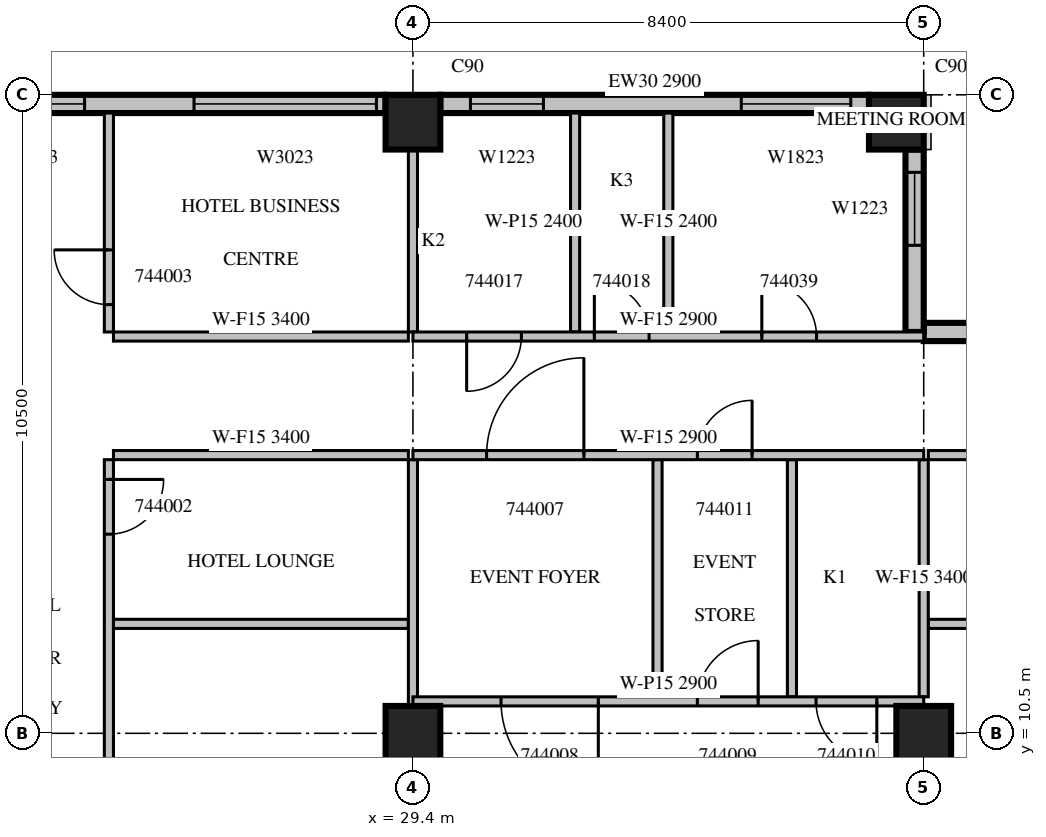
"""IFC4 building model, lengths in metres.
Left out: names, types, materials, properties, quantities, classifications, styles, units other than length and angle.
Written with IfcOpenShell. Run it as: python <this file> out.ifc"""

import sys

from ifc_helpers import new_model, si_unit, direction, frame, frame_2d, origin, origin_2d, place, context, subcontext, project, spatial, rectangle, extrude, source, transform, mapped, element, fill, save


model = new_model("IFC4")
c1 = context("Model", 3, precision=1e-05, world=origin(), true_north=direction((0.0, 1.0)))
c2 = subcontext(c1, "Body", "Model", "MODEL_VIEW")
j1 = project(units=[si_unit("LENGTHUNIT", "METRE"), si_unit("PLANEANGLEUNIT", "RADIAN")], contexts=[c1])
p1 = place(None, origin())
s1 = spatial("IfcSite", under=j1, at=p1, CompositionType="ELEMENT")
p2 = place(p1, origin())
s2 = spatial("IfcBuilding", under=s1, at=p2, CompositionType="ELEMENT")
p3 = place(p2, frame((0.0, 0.0, 200.6)))
s3 = spatial("IfcBuildingStorey", under=s2, at=p3, CompositionType="ELEMENT", Elevation=200.6)
m1 = source(origin(), c2, "Body", "SweptSolid", [
    extrude(rectangle(XDim=0.9, YDim=0.9, at=origin_2d()), origin(), (0.0, 0.0, 1.0), 3.8),
])
for number, where, z_axis, x_axis in (
    (1, (29.4, 10.5, 0.0), (0.0, 0.0, 1.0), (1.0, 0.0, 0.0)),
    (2, (37.8, 10.5, 0.0), (0.0, 0.0, 1.0), (1.0, 0.0, 0.0)),
    (3, (29.4, 20.55, 0.0), (0.0, 0.0, 1.0), (1.0, 0.0, 0.0)),
    (4, (37.35, 20.55, 0.0), (0.0, 0.0, 1.0), (1.0, 0.0, 0.0)),
):
    element("IfcColumn", number, at=place(p3, frame(where, z_axis=z_axis, x_axis=x_axis)), inside=s3, PredefinedType="COLUMN", context=c2, shape_type="MappedRepresentation", body=[
        mapped(m1, transform((0.0, 0.0, 0.0), scale=1.0)),
    ])
p4 = place(p3, frame((53.56, 17.1, 0.0), z_axis=(0.0, 0.0, 1.0), x_axis=(-1.0, 0.0, 0.0)))
e5 = element("IfcWall", 5, at=p4, inside=s3, PredefinedType="STANDARD", context=c2, shape_type="SweptSolid", body=[
    extrude(rectangle(XDim=15.76, YDim=0.3, at=frame_2d((7.88, 0.0))), origin(), (0.0, 0.0, 1.0), 3.4),
])
m2 = source(origin(), c2, "Body", "SweptSolid", [
    extrude(rectangle(XDim=3.6, YDim=2.3, at=frame_2d((1.8, 1.15))), frame((0.0, 0.16, 0.0), z_axis=(0.0, -1.0, 0.0), x_axis=(1.0, 0.0, 0.0)), (0.0, 0.0, 1.0), 0.32),
])
p5 = place(p4, frame((3.46, 0.0, 0.6)))
e6 = element("IfcOpeningElement", 6, at=p5, cuts=e5, PredefinedType="OPENING", context=c2, shape_type="MappedRepresentation", body=[
    mapped(m2, transform((0.0, 0.0, 0.0), scale=1.0)),
])
p6 = place(p4, frame((9.34, 0.0, 0.6)))
e7 = element("IfcOpeningElement", 7, at=p6, cuts=e5, PredefinedType="OPENING", context=c2, shape_type="MappedRepresentation", body=[
    mapped(m2, transform((0.0, 0.0, 0.0), scale=1.0)),
])
m3 = source(origin(), c2, "Body", "SweptSolid", [
    extrude(rectangle(XDim=2.4, YDim=2.3, at=frame_2d((1.2, 1.15))), frame((0.0, 0.16, 0.0), z_axis=(0.0, -1.0, 0.0), x_axis=(1.0, 0.0, 0.0)), (0.0, 0.0, 1.0), 0.32),
])
p7 = place(p4, frame((0.53, 0.0, 0.6)))
e8 = element("IfcOpeningElement", 8, at=p7, cuts=e5, PredefinedType="OPENING", context=c2, shape_type="MappedRepresentation", body=[
    mapped(m3, transform((0.0, 0.0, 0.0), scale=1.0)),
])
m4 = source(origin(), c2, "Body", "SweptSolid", [
    extrude(rectangle(XDim=3.0, YDim=0.3, at=frame_2d((1.5, 0.0))), origin(), (0.0, 0.0, 1.0), 3.4),
])
p8 = place(p3, frame((37.65, 17.1, 0.0), z_axis=(0.0, 0.0, 1.0), x_axis=(0.0, 1.0, 0.0)))
e9 = element("IfcWall", 9, at=p8, inside=s3, PredefinedType="STANDARD", context=c2, shape_type="MappedRepresentation", body=[
    mapped(m4, transform((0.0, 0.0, 0.0), scale=1.0)),
])
m5 = source(origin(), c2, "Body", "SweptSolid", [
    extrude(rectangle(XDim=1.2, YDim=2.3, at=frame_2d((0.6, 1.15))), frame((0.0, 0.16, 0.0), z_axis=(0.0, -1.0, 0.0), x_axis=(1.0, 0.0, 0.0)), (0.0, 0.0, 1.0), 0.32),
])
p9 = place(p8, frame((1.425, 0.0, 0.6)))
e10 = element("IfcOpeningElement", 10, at=p9, cuts=e9, PredefinedType="OPENING", context=c2, shape_type="MappedRepresentation", body=[
    mapped(m5, transform((0.0, 0.0, 0.0), scale=1.0)),
])
m6 = source(origin(), c2, "Body", "SweptSolid", [
    extrude(rectangle(XDim=7.05, YDim=0.3, at=frame_2d((3.525, 0.0))), origin(), (0.0, 0.0, 1.0), 2.9),
])
p10 = place(p3, frame((36.9, 20.85, 0.0), z_axis=(0.0, 0.0, 1.0), x_axis=(-1.0, 0.0, 0.0)))
e11 = element("IfcWall", 11, at=p10, inside=s3, PredefinedType="STANDARD", context=c2, shape_type="MappedRepresentation", body=[
    mapped(m6, transform((0.0, 0.0, 0.0), scale=1.0)),
])
m7 = source(origin(), c2, "Body", "SweptSolid", [
    extrude(rectangle(XDim=1.8, YDim=2.3, at=frame_2d((0.9, 1.15))), frame((0.0, 0.16, 0.0), z_axis=(0.0, -1.0, 0.0), x_axis=(1.0, 0.0, 0.0)), (0.0, 0.0, 1.0), 0.32),
])
p11 = place(p10, frame((0.3, 0.0, 0.6)))
e12 = element("IfcOpeningElement", 12, at=p11, cuts=e11, PredefinedType="OPENING", context=c2, shape_type="MappedRepresentation", body=[
    mapped(m7, transform((0.0, 0.0, 0.0), scale=1.0)),
])
p12 = place(p10, frame((5.354, 0.0, 0.6)))
e13 = element("IfcOpeningElement", 13, at=p12, cuts=e11, PredefinedType="OPENING", context=c2, shape_type="MappedRepresentation", body=[
    mapped(m5, transform((0.0, 0.0, 0.0), scale=1.0)),
])
m8 = source(origin(), c2, "Body", "SweptSolid", [
    extrude(rectangle(XDim=7.15, YDim=0.3, at=frame_2d((3.575, 0.0))), origin(), (0.0, 0.0, 1.0), 3.4),
])
p13 = place(p3, frame((28.95, 20.85, 0.0), z_axis=(0.0, 0.0, 1.0), x_axis=(-1.0, 0.0, 0.0)))
e14 = element("IfcWall", 14, at=p13, inside=s3, PredefinedType="STANDARD", context=c2, shape_type="MappedRepresentation", body=[
    mapped(m8, transform((0.0, 0.0, 0.0), scale=1.0)),
])
m9 = source(origin(), c2, "Body", "SweptSolid", [
    extrude(rectangle(XDim=3.0, YDim=2.3, at=frame_2d((1.5, 1.15))), frame((0.0, 0.16, 0.0), z_axis=(0.0, -1.0, 0.0), x_axis=(1.0, 0.0, 0.0)), (0.0, 0.0, 1.0), 0.32),
])
p14 = place(p13, frame((0.15, 0.0, 0.6)))
e15 = element("IfcOpeningElement", 15, at=p14, cuts=e14, PredefinedType="OPENING", context=c2, shape_type="MappedRepresentation", body=[
    mapped(m9, transform((0.0, 0.0, 0.0), scale=1.0)),
])
p15 = place(p13, frame((4.95, 0.0, 0.6)))
e16 = element("IfcOpeningElement", 16, at=p15, cuts=e14, PredefinedType="OPENING", context=c2, shape_type="MappedRepresentation", body=[
    mapped(m7, transform((0.0, 0.0, 0.0), scale=1.0)),
])
m10 = source(origin(), c2, "Body", "SweptSolid", [
    extrude(rectangle(XDim=11.525, YDim=0.15, at=frame_2d((5.763, 0.0))), origin(), (0.0, 0.0, 1.0), 3.4),
])
p16 = place(p3, frame((24.4, 15.0, 0.0), z_axis=(0.0, 0.0, 1.0), x_axis=(0.0, -1.0, 0.0)))
e17 = element("IfcWall", 17, at=p16, inside=s3, PredefinedType="PARTITIONING", context=c2, shape_type="MappedRepresentation", body=[
    mapped(m10, transform((0.0, 0.0, 0.0), scale=1.0)),
])
m11 = source(origin(), c2, "Body", "SweptSolid", [
    extrude(rectangle(XDim=0.9, YDim=2.1, at=frame_2d((0.45, 1.05))), frame((0.0, 0.085, 0.0), z_axis=(0.0, -1.0, 0.0), x_axis=(1.0, 0.0, 0.0)), (0.0, 0.0, 1.0), 0.17),
])
p17 = place(p16, frame((6.963, 0.0, 0.0)))
e18 = element("IfcOpeningElement", 18, at=p17, cuts=e17, PredefinedType="OPENING", context=c2, shape_type="MappedRepresentation", body=[
    mapped(m11, transform((0.0, 0.0, 0.0), scale=1.0)),
])
p18 = place(p16, frame((0.325, 0.0, 0.0)))
e19 = element("IfcOpeningElement", 19, at=p18, cuts=e17, PredefinedType="OPENING", context=c2, shape_type="MappedRepresentation", body=[
    mapped(m11, transform((0.0, 0.0, 0.0), scale=1.0)),
])
m12 = source(origin(), c2, "Body", "SweptSolid", [
    extrude(rectangle(XDim=3.6, YDim=0.15, at=frame_2d((1.8, 0.0))), origin(), (0.0, 0.0, 1.0), 3.4),
])
p19 = place(p3, frame((24.4, 20.7, 0.0), z_axis=(0.0, 0.0, 1.0), x_axis=(0.0, -1.0, 0.0)))
e20 = element("IfcWall", 20, at=p19, inside=s3, PredefinedType="PARTITIONING", context=c2, shape_type="MappedRepresentation", body=[
    mapped(m12, transform((0.0, 0.0, 0.0), scale=1.0)),
])
p20 = place(p19, frame((2.25, 0.0, 0.0)))
e21 = element("IfcOpeningElement", 21, at=p20, cuts=e20, PredefinedType="OPENING", context=c2, shape_type="MappedRepresentation", body=[
    mapped(m11, transform((0.0, 0.0, 0.0), scale=1.0)),
])
p21 = place(p3, frame((29.325, 12.3, 0.0), z_axis=(0.0, 0.0, 1.0), x_axis=(-1.0, 0.0, 0.0)))
e22 = element("IfcWall", 22, at=p21, inside=s3, PredefinedType="PARTITIONING", context=c2, shape_type="SweptSolid", body=[
    extrude(rectangle(XDim=4.85, YDim=0.15, at=frame_2d((2.425, 0.0))), origin(), (0.0, 0.0, 1.0), 3.4),
])
m13 = source(origin(), c2, "Body", "SweptSolid", [
    extrude(rectangle(XDim=4.85, YDim=0.15, at=frame_2d((2.425, 0.0))), origin(), (0.0, 0.0, 1.0), 3.4),
])
for number, where, z_axis, x_axis in (
    (23, (29.325, 15.075, 0.0), (0.0, 0.0, 1.0), (-1.0, 0.0, 0.0)),
    (24, (24.475, 17.025, 0.0), (0.0, 0.0, 1.0), (1.0, 0.0, 0.0)),
):
    element("IfcWall", number, at=place(p3, frame(where, z_axis=z_axis, x_axis=x_axis)), inside=s3, PredefinedType="PARTITIONING", context=c2, shape_type="MappedRepresentation", body=[
        mapped(m13, transform((0.0, 0.0, 0.0), scale=1.0)),
    ])
m14 = source(origin(), c2, "Body", "SweptSolid", [
    extrude(rectangle(XDim=4.051, YDim=0.15, at=frame_2d((2.026, 0.0))), origin(), (0.0, 0.0, 1.0), 3.4),
])
p22 = place(p3, frame((29.4, 10.949, 0.0), z_axis=(0.0, 0.0, 1.0), x_axis=(0.0, 1.0, 0.0)))
e25 = element("IfcWall", 25, at=p22, inside=s3, PredefinedType="PARTITIONING", context=c2, shape_type="MappedRepresentation", body=[
    mapped(m14, transform((0.0, 0.0, 0.0), scale=1.0)),
])
m15 = source(origin(), c2, "Body", "SweptSolid", [
    extrude(rectangle(XDim=3.001, YDim=0.15, at=frame_2d((1.5, 0.0))), origin(), (0.0, 0.0, 1.0), 3.4),
])
p23 = place(p3, frame((29.4, 17.1, 0.0), z_axis=(0.0, 0.0, 1.0), x_axis=(0.0, 1.0, 0.0)))
e26 = element("IfcWall", 26, at=p23, inside=s3, PredefinedType="PARTITIONING", context=c2, shape_type="MappedRepresentation", body=[
    mapped(m15, transform((0.0, 0.0, 0.0), scale=1.0)),
])
m16 = source(origin(), c2, "Body", "SweptSolid", [
    extrude(rectangle(XDim=6.45, YDim=0.15, at=frame_2d((3.225, 0.0))), origin(), (0.0, 0.0, 1.0), 3.4),
])
p24 = place(p3, frame((37.875, 12.3, 0.0), z_axis=(0.0, 0.0, 1.0), x_axis=(1.0, 0.0, 0.0)))
e27 = element("IfcWall", 27, at=p24, inside=s3, PredefinedType="PARTITIONING", context=c2, shape_type="MappedRepresentation", body=[
    mapped(m16, transform((0.0, 0.0, 0.0), scale=1.0)),
])
p25 = place(p3, frame((44.325, 15.075, 0.0), z_axis=(0.0, 0.0, 1.0), x_axis=(-1.0, 0.0, 0.0)))
e28 = element("IfcWall", 28, at=p25, inside=s3, PredefinedType="PARTITIONING", context=c2, shape_type="MappedRepresentation", body=[
    mapped(m16, transform((0.0, 0.0, 0.0), scale=1.0)),
])
p26 = place(p25, frame((2.812, 0.0, 0.0)))
e29 = element("IfcOpeningElement", 29, at=p26, cuts=e28, PredefinedType="OPENING", context=c2, shape_type="MappedRepresentation", body=[
    mapped(m11, transform((0.0, 0.0, 0.0), scale=1.0)),
])
m17 = source(origin(), c2, "Body", "SweptSolid", [
    extrude(rectangle(XDim=3.9, YDim=0.15, at=frame_2d((1.95, 0.0))), origin(), (0.0, 0.0, 1.0), 3.4),
])
for number, where, z_axis, x_axis in (
    (30, (33.422, 11.1, 0.0), (0.0, 0.0, 1.0), (0.0, 1.0, 0.0)),
    (31, (35.633, 11.1, 0.0), (0.0, 0.0, 1.0), (0.0, 1.0, 0.0)),
    (32, (37.8, 11.1, 0.0), (0.0, 0.0, 1.0), (0.0, 1.0, 0.0)),
):
    element("IfcWall", number, at=place(p3, frame(where, z_axis=z_axis, x_axis=x_axis)), inside=s3, PredefinedType="PARTITIONING", context=c2, shape_type="MappedRepresentation", body=[
        mapped(m17, transform((0.0, 0.0, 0.0), scale=1.0)),
    ])
m18 = source(origin(), c2, "Body", "SweptSolid", [
    extrude(rectangle(XDim=8.4, YDim=0.15, at=frame_2d((4.2, 0.0))), origin(), (0.0, 0.0, 1.0), 2.9),
])
p27 = place(p3, frame((37.8, 11.025, 0.0), z_axis=(0.0, 0.0, 1.0), x_axis=(-1.0, 0.0, 0.0)))
e33 = element("IfcWall", 33, at=p27, inside=s3, PredefinedType="PARTITIONING", context=c2, shape_type="MappedRepresentation", body=[
    mapped(m18, transform((0.0, 0.0, 0.0), scale=1.0)),
])
m19 = source(origin(), c2, "Body", "SweptSolid", [
    extrude(rectangle(XDim=1.6, YDim=2.1, at=frame_2d((0.8, 1.05))), frame((0.0, 0.085, 0.0), z_axis=(0.0, -1.0, 0.0), x_axis=(1.0, 0.0, 0.0)), (0.0, 0.0, 1.0), 0.17),
])
p28 = place(p27, frame((5.351, 0.0, 0.0)))
e34 = element("IfcOpeningElement", 34, at=p28, cuts=e33, PredefinedType="OPENING", context=c2, shape_type="MappedRepresentation", body=[
    mapped(m19, transform((0.0, 0.0, 0.0), scale=1.0)),
])
m20 = source(origin(), c2, "Body", "SweptSolid", [
    extrude(rectangle(XDim=1.0, YDim=2.1, at=frame_2d((0.5, 1.05))), frame((0.0, 0.085, 0.0), z_axis=(0.0, -1.0, 0.0), x_axis=(1.0, 0.0, 0.0)), (0.0, 0.0, 1.0), 0.17),
])
p29 = place(p27, frame((2.722, 0.0, 0.0)))
e35 = element("IfcOpeningElement", 35, at=p29, cuts=e33, PredefinedType="OPENING", context=c2, shape_type="MappedRepresentation", body=[
    mapped(m20, transform((0.0, 0.0, 0.0), scale=1.0)),
])
p30 = place(p27, frame((0.771, 0.0, 0.0)))
e36 = element("IfcOpeningElement", 36, at=p30, cuts=e33, PredefinedType="OPENING", context=c2, shape_type="MappedRepresentation", body=[
    mapped(m20, transform((0.0, 0.0, 0.0), scale=1.0)),
])
m21 = source(origin(), c2, "Body", "SweptSolid", [
    extrude(rectangle(XDim=3.6, YDim=0.15, at=frame_2d((1.8, 0.0))), origin(), (0.0, 0.0, 1.0), 2.4),
])
for number, where, z_axis, x_axis in (
    (37, (32.067, 20.7, 0.0), (0.0, 0.0, 1.0), (0.0, -1.0, 0.0)),
    (38, (33.6, 17.1, 0.0), (0.0, 0.0, 1.0), (0.0, 1.0, 0.0)),
):
    element("IfcWall", number, at=place(p3, frame(where, z_axis=z_axis, x_axis=x_axis)), inside=s3, PredefinedType="PARTITIONING", context=c2, shape_type="MappedRepresentation", body=[
        mapped(m21, transform((0.0, 0.0, 0.0), scale=1.0)),
    ])
p31 = place(p3, frame((37.8, 15.075, 0.0), z_axis=(0.0, 0.0, 1.0), x_axis=(-1.0, 0.0, 0.0)))
e39 = element("IfcWall", 39, at=p31, inside=s3, PredefinedType="PARTITIONING", context=c2, shape_type="MappedRepresentation", body=[
    mapped(m18, transform((0.0, 0.0, 0.0), scale=1.0)),
])
p32 = place(p31, frame((5.589, 0.0, 0.0)))
e40 = element("IfcOpeningElement", 40, at=p32, cuts=e39, PredefinedType="OPENING", context=c2, shape_type="MappedRepresentation", body=[
    mapped(m19, transform((0.0, 0.0, 0.0), scale=1.0)),
])
p33 = place(p31, frame((2.822, 0.0, 0.0)))
e41 = element("IfcOpeningElement", 41, at=p33, cuts=e39, PredefinedType="OPENING", context=c2, shape_type="MappedRepresentation", body=[
    mapped(m11, transform((0.0, 0.0, 0.0), scale=1.0)),
])
p34 = place(p3, frame((29.4, 17.025, 0.0), z_axis=(0.0, 0.0, 1.0), x_axis=(1.0, 0.0, 0.0)))
e42 = element("IfcWall", 42, at=p34, inside=s3, PredefinedType="PARTITIONING", context=c2, shape_type="MappedRepresentation", body=[
    mapped(m18, transform((0.0, 0.0, 0.0), scale=1.0)),
])
p35 = place(p34, frame((0.883, 0.0, 0.0)))
e43 = element("IfcOpeningElement", 43, at=p35, cuts=e42, PredefinedType="OPENING", context=c2, shape_type="MappedRepresentation", body=[
    mapped(m11, transform((0.0, 0.0, 0.0), scale=1.0)),
])
p36 = place(p34, frame((2.983, 0.0, 0.0)))
e44 = element("IfcOpeningElement", 44, at=p36, cuts=e42, PredefinedType="OPENING", context=c2, shape_type="MappedRepresentation", body=[
    mapped(m11, transform((0.0, 0.0, 0.0), scale=1.0)),
])
p37 = place(p34, frame((5.737, 0.0, 0.0)))
e45 = element("IfcOpeningElement", 45, at=p37, cuts=e42, PredefinedType="OPENING", context=c2, shape_type="MappedRepresentation", body=[
    mapped(m11, transform((0.0, 0.0, 0.0), scale=1.0)),
])
m22 = source(origin(), c2, "Body", "SweptSolid", [
    extrude(rectangle(XDim=1.2, YDim=2.3, at=frame_2d((0.6, 1.15))), frame((0.0, 0.03, 0.0), z_axis=(0.0, -1.0, 0.0), x_axis=(1.0, 0.0, 0.0)), (0.0, 0.0, 1.0), 0.06),
])
p38 = place(p9, origin())
e46 = element("IfcWindow", 46, at=p38, inside=s3, PartitioningType="SINGLE_PANEL", PredefinedType="WINDOW", context=c2, shape_type="MappedRepresentation", body=[
    mapped(m22, transform((0.0, 0.0, 0.0), scale=1.0)),
])
fill(e10, e46)
m23 = source(origin(), c2, "Body", "SweptSolid", [
    extrude(rectangle(XDim=1.8, YDim=2.3, at=frame_2d((0.9, 1.15))), frame((0.0, 0.03, 0.0), z_axis=(0.0, -1.0, 0.0), x_axis=(1.0, 0.0, 0.0)), (0.0, 0.0, 1.0), 0.06),
])
p39 = place(p11, origin())
e47 = element("IfcWindow", 47, at=p39, inside=s3, PartitioningType="SINGLE_PANEL", PredefinedType="WINDOW", context=c2, shape_type="MappedRepresentation", body=[
    mapped(m23, transform((0.0, 0.0, 0.0), scale=1.0)),
])
fill(e12, e47)
p40 = place(p12, origin())
e48 = element("IfcWindow", 48, at=p40, inside=s3, PartitioningType="SINGLE_PANEL", PredefinedType="WINDOW", context=c2, shape_type="MappedRepresentation", body=[
    mapped(m22, transform((0.0, 0.0, 0.0), scale=1.0)),
])
fill(e13, e48)
m24 = source(origin(), c2, "Body", "SweptSolid", [
    extrude(rectangle(XDim=3.0, YDim=2.3, at=frame_2d((1.5, 1.15))), frame((0.0, 0.03, 0.0), z_axis=(0.0, -1.0, 0.0), x_axis=(1.0, 0.0, 0.0)), (0.0, 0.0, 1.0), 0.06),
])
p41 = place(p14, origin())
e49 = element("IfcWindow", 49, at=p41, inside=s3, PartitioningType="SINGLE_PANEL", PredefinedType="WINDOW", context=c2, shape_type="MappedRepresentation", body=[
    mapped(m24, transform((0.0, 0.0, 0.0), scale=1.0)),
])
fill(e15, e49)
p42 = place(p15, origin())
e50 = element("IfcWindow", 50, at=p42, inside=s3, PartitioningType="SINGLE_PANEL", PredefinedType="WINDOW", context=c2, shape_type="MappedRepresentation", body=[
    mapped(m23, transform((0.0, 0.0, 0.0), scale=1.0)),
])
fill(e16, e50)
m25 = source(origin(), c2, "Body", "SweptSolid", [
    extrude(rectangle(XDim=0.9, YDim=2.1, at=frame_2d((0.45, 1.05))), frame((0.0, 0.025, 0.0), z_axis=(0.0, -1.0, 0.0), x_axis=(1.0, 0.0, 0.0)), (0.0, 0.0, 1.0), 0.05),
])
p43 = place(p18, origin())
e51 = element("IfcDoor", 51, at=p43, inside=s3, OperationType="SINGLE_SWING_LEFT", PredefinedType="DOOR", context=c2, shape_type="MappedRepresentation", body=[
    mapped(m25, transform((0.0, 0.0, 0.0), scale=1.0)),
])
fill(e19, e51)
p44 = place(p20, origin())
e52 = element("IfcDoor", 52, at=p44, inside=s3, OperationType="SINGLE_SWING_RIGHT", PredefinedType="DOOR", context=c2, shape_type="MappedRepresentation", body=[
    mapped(m25, transform((0.0, 0.0, 0.0), scale=1.0)),
])
fill(e21, e52)
m26 = source(origin(), c2, "Body", "SweptSolid", [
    extrude(rectangle(XDim=1.6, YDim=2.1, at=frame_2d((0.8, 1.05))), frame((0.0, 0.025, 0.0), z_axis=(0.0, -1.0, 0.0), x_axis=(1.0, 0.0, 0.0)), (0.0, 0.0, 1.0), 0.05),
])
p45 = place(p32, origin())
e53 = element("IfcDoor", 53, at=p45, inside=s3, OperationType="SINGLE_SWING_RIGHT", PredefinedType="DOOR", context=c2, shape_type="MappedRepresentation", body=[
    mapped(m26, transform((0.0, 0.0, 0.0), scale=1.0)),
])
fill(e40, e53)
p46 = place(p28, origin())
e54 = element("IfcDoor", 54, at=p46, inside=s3, OperationType="SINGLE_SWING_LEFT", PredefinedType="DOOR", context=c2, shape_type="MappedRepresentation", body=[
    mapped(m26, transform((0.0, 0.0, 0.0), scale=1.0)),
])
fill(e34, e54)
m27 = source(origin(), c2, "Body", "SweptSolid", [
    extrude(rectangle(XDim=1.0, YDim=2.1, at=frame_2d((0.5, 1.05))), frame((0.0, 0.025, 0.0), z_axis=(0.0, -1.0, 0.0), x_axis=(1.0, 0.0, 0.0)), (0.0, 0.0, 1.0), 0.05),
])
p47 = place(p29, origin())
e55 = element("IfcDoor", 55, at=p47, inside=s3, OperationType="SINGLE_SWING_RIGHT", PredefinedType="DOOR", context=c2, shape_type="MappedRepresentation", body=[
    mapped(m27, transform((0.0, 0.0, 0.0), scale=1.0)),
])
fill(e35, e55)
p48 = place(p30, origin())
e56 = element("IfcDoor", 56, at=p48, inside=s3, OperationType="SINGLE_SWING_LEFT", PredefinedType="DOOR", context=c2, shape_type="MappedRepresentation", body=[
    mapped(m27, transform((0.0, 0.0, 0.0), scale=1.0)),
])
fill(e36, e56)
p49 = place(p33, origin())
e57 = element("IfcDoor", 57, at=p49, inside=s3, OperationType="SINGLE_SWING_RIGHT", PredefinedType="DOOR", context=c2, shape_type="MappedRepresentation", body=[
    mapped(m25, transform((0.0, 0.0, 0.0), scale=1.0)),
])
fill(e41, e57)
p50 = place(p35, origin())
e58 = element("IfcDoor", 58, at=p50, inside=s3, OperationType="SINGLE_SWING_RIGHT", PredefinedType="DOOR", context=c2, shape_type="MappedRepresentation", body=[
    mapped(m25, transform((0.0, 0.0, 0.0), scale=1.0)),
])
fill(e43, e58)
p51 = place(p36, origin())
e59 = element("IfcDoor", 59, at=p51, inside=s3, OperationType="SINGLE_SWING_LEFT", PredefinedType="DOOR", context=c2, shape_type="MappedRepresentation", body=[
    mapped(m25, transform((0.0, 0.0, 0.0), scale=1.0)),
])
fill(e44, e59)
p52 = place(p37, origin())
e60 = element("IfcDoor", 60, at=p52, inside=s3, OperationType="SINGLE_SWING_LEFT", PredefinedType="DOOR", context=c2, shape_type="MappedRepresentation", body=[
    mapped(m25, transform((0.0, 0.0, 0.0), scale=1.0)),
])
fill(e45, e60)
save(model, sys.argv[1])
